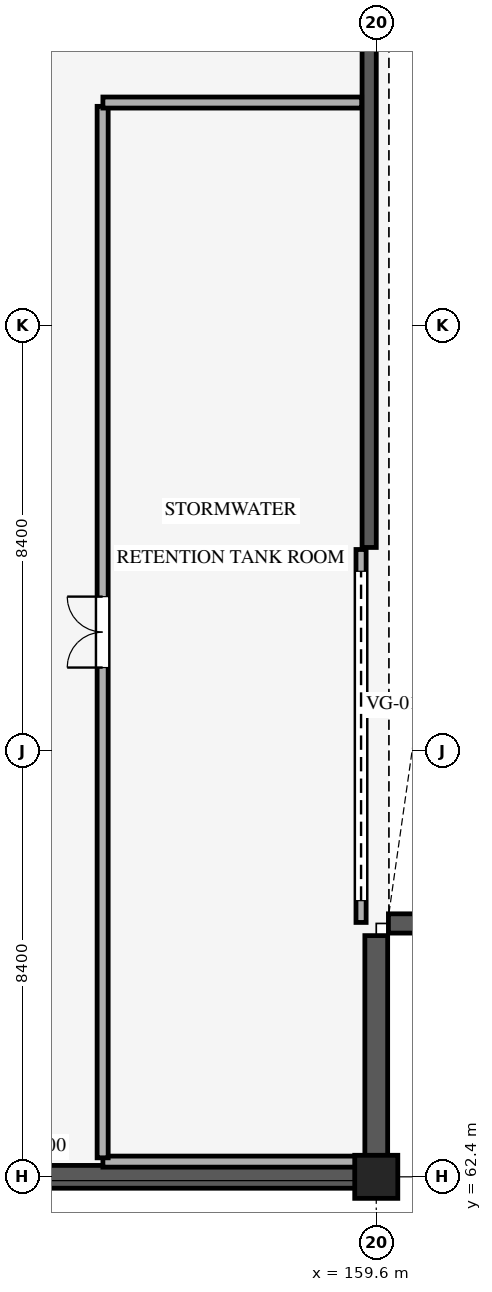
"""IFC4 building model, lengths in metres.
Left out: names, types, materials, properties, quantities, classifications, styles, units other than length and angle.
Written with IfcOpenShell. Run it as: python <this file> out.ifc"""

import sys

from ifc_helpers import new_model, si_unit, direction, frame, frame_2d, origin, origin_2d, place, context, subcontext, project, spatial, rectangle, extrude, element, fill, save


model = new_model("IFC4")
c1 = context("Model", 3, precision=1e-05, world=origin(), true_north=direction((0.0, 1.0)))
c2 = subcontext(c1, "Body", "Model", "MODEL_VIEW")
j1 = project(units=[si_unit("LENGTHUNIT", "METRE"), si_unit("PLANEANGLEUNIT", "RADIAN")], contexts=[c1])
p1 = place(None, origin())
s1 = spatial("IfcSite", under=j1, at=p1, CompositionType="ELEMENT")
p2 = place(p1, origin())
s2 = spatial("IfcBuilding", under=s1, at=p2, CompositionType="ELEMENT")
p3 = place(p2, frame((0.0, 0.0, -4.8)))
s3 = spatial("IfcBuildingStorey", under=s2, at=p3, CompositionType="ELEMENT", Elevation=-4.8)
p4 = place(p3, frame((159.6, 62.4, 0.0), z_axis=(0.0, 0.0, 1.0), x_axis=(1.0, 0.0, 0.0)))
e1 = element("IfcColumn", 1, at=p4, inside=s3, PredefinedType="COLUMN", context=c2, shape_type="SweptSolid", body=[
    extrude(rectangle(XDim=0.85, YDim=0.85, at=origin_2d()), origin(), (0.0, 0.0, 1.0), 4.8),
])
p5 = place(p3, frame((166.36, 67.4, 0.0), z_axis=(0.0, 0.0, 1.0), x_axis=(-1.0, 0.0, 0.0)))
e2 = element("IfcWall", 2, at=p5, inside=s3, PredefinedType="USERDEFINED", context=c2, shape_type="SweptSolid", body=[
    extrude(rectangle(XDim=6.52, YDim=0.38, at=frame_2d((3.26, 0.0))), origin(), (0.0, 0.0, 1.0), 4.8),
])
p6 = place(p3, frame((159.6, 67.16, 0.0), z_axis=(0.0, 0.0, 1.0), x_axis=(0.0, -1.0, 0.0)))
e3 = element("IfcWall", 3, at=p6, inside=s3, PredefinedType="USERDEFINED", context=c2, shape_type="SweptSolid", body=[
    extrude(rectangle(XDim=4.52, YDim=0.45, at=frame_2d((2.26, 0.0))), origin(), (0.0, 0.0, 1.0), 4.47),
])
p7 = place(p3, frame((159.36, 62.4, 0.0), z_axis=(0.0, 0.0, 1.0), x_axis=(-1.0, 0.0, 0.0)))
e4 = element("IfcWall", 4, at=p7, inside=s3, PredefinedType="USERDEFINED", context=c2, shape_type="SweptSolid", body=[
    extrude(rectangle(XDim=61.92, YDim=0.45, at=frame_2d((30.96, 0.0))), origin(), (0.0, 0.0, 1.0), 4.47),
])
p8 = place(p3, frame((159.46, 74.82, 0.0), z_axis=(0.0, 0.0, 1.0), x_axis=(0.0, 1.0, 0.0)))
e5 = element("IfcWall", 5, at=p8, inside=s3, PredefinedType="SHEAR", context=c2, shape_type="SweptSolid", body=[
    extrude(rectangle(XDim=20.73, YDim=0.28, at=frame_2d((10.365, 0.0))), origin(), (0.0, 0.0, 1.0), 4.435),
])
p9 = place(p3, frame((159.3, 67.42, 0.0), z_axis=(0.0, 0.0, 1.0), x_axis=(0.0, 1.0, 0.0)))
e6 = element("IfcWall", 6, at=p9, inside=s3, PredefinedType="STANDARD", context=c2, shape_type="SweptSolid", body=[
    extrude(rectangle(XDim=7.36, YDim=0.2, at=frame_2d((3.68, 0.0))), origin(), (0.0, 0.0, 1.0), 4.435),
])
p10 = place(p9, frame((0.43, 0.0, 0.0)))
e7 = element("IfcOpeningElement", 7, at=p10, cuts=e6, PredefinedType="OPENING", context=c2, shape_type="SweptSolid", body=[
    extrude(rectangle(XDim=6.5, YDim=3.4, at=frame_2d((3.25, 1.7))), frame((0.0, 0.11, 0.0), z_axis=(0.0, -1.0, 0.0), x_axis=(1.0, 0.0, 0.0)), (0.0, 0.0, 1.0), 0.22),
])
p11 = place(p3, frame((159.295, 62.7, 0.0), z_axis=(0.0, 0.0, 1.0), x_axis=(-1.0, 0.0, 0.0)))
e8 = element("IfcWall", 8, at=p11, inside=s3, PredefinedType="STANDARD", context=c2, shape_type="SweptSolid", body=[
    extrude(rectangle(XDim=5.09, YDim=0.218, at=frame_2d((2.545, 0.0))), origin(), (0.0, 0.0, 1.0), 4.45),
])
p12 = place(p3, frame((154.2, 62.775, 0.0), z_axis=(0.0, 0.0, 1.0), x_axis=(0.0, 1.0, 0.0)))
e9 = element("IfcWall", 9, at=p12, inside=s3, PredefinedType="STANDARD", context=c2, shape_type="SweptSolid", body=[
    extrude(rectangle(XDim=20.75, YDim=0.218, at=frame_2d((10.375, 0.0))), origin(), (0.0, 0.0, 1.0), 4.45),
])
p13 = place(p12, frame((9.675, 0.0, 0.0)))
e10 = element("IfcOpeningElement", 10, at=p13, cuts=e9, PredefinedType="OPENING", context=c2, shape_type="SweptSolid", body=[
    extrude(rectangle(XDim=1.4, YDim=2.2, at=frame_2d((0.7, 1.1))), frame((0.0, 0.119, 0.0), z_axis=(0.0, -1.0, 0.0), x_axis=(1.0, 0.0, 0.0)), (0.0, 0.0, 1.0), 0.238),
])
p14 = place(p3, frame((154.205, 83.6, 0.0), z_axis=(0.0, 0.0, 1.0), x_axis=(1.0, 0.0, 0.0)))
e11 = element("IfcWall", 11, at=p14, inside=s3, PredefinedType="STANDARD", context=c2, shape_type="SweptSolid", body=[
    extrude(rectangle(XDim=5.107, YDim=0.218, at=frame_2d((2.553, 0.0))), origin(), (0.0, 0.0, 1.0), 4.45),
])
p15 = place(p10, origin())
e12 = element("IfcDoor", 12, at=p15, inside=s3, OperationType="ROLLINGUP", PredefinedType="GATE", context=c2, shape_type="SweptSolid", body=[
    extrude(rectangle(XDim=6.5, YDim=3.4, at=frame_2d((3.25, 1.7))), frame((0.0, 0.025, 0.0), z_axis=(0.0, -1.0, 0.0), x_axis=(1.0, 0.0, 0.0)), (0.0, 0.0, 1.0), 0.05),
])
fill(e7, e12)
p16 = place(p13, origin())
e13 = element("IfcDoor", 13, at=p16, inside=s3, OperationType="DOUBLE_DOOR_SINGLE_SWING", PredefinedType="DOOR", context=c2, shape_type="SweptSolid", body=[
    extrude(rectangle(XDim=1.4, YDim=2.2, at=frame_2d((0.7, 1.1))), frame((0.0, 0.025, 0.0), z_axis=(0.0, -1.0, 0.0), x_axis=(1.0, 0.0, 0.0)), (0.0, 0.0, 1.0), 0.05),
])
fill(e10, e13)
save(model, sys.argv[1])
